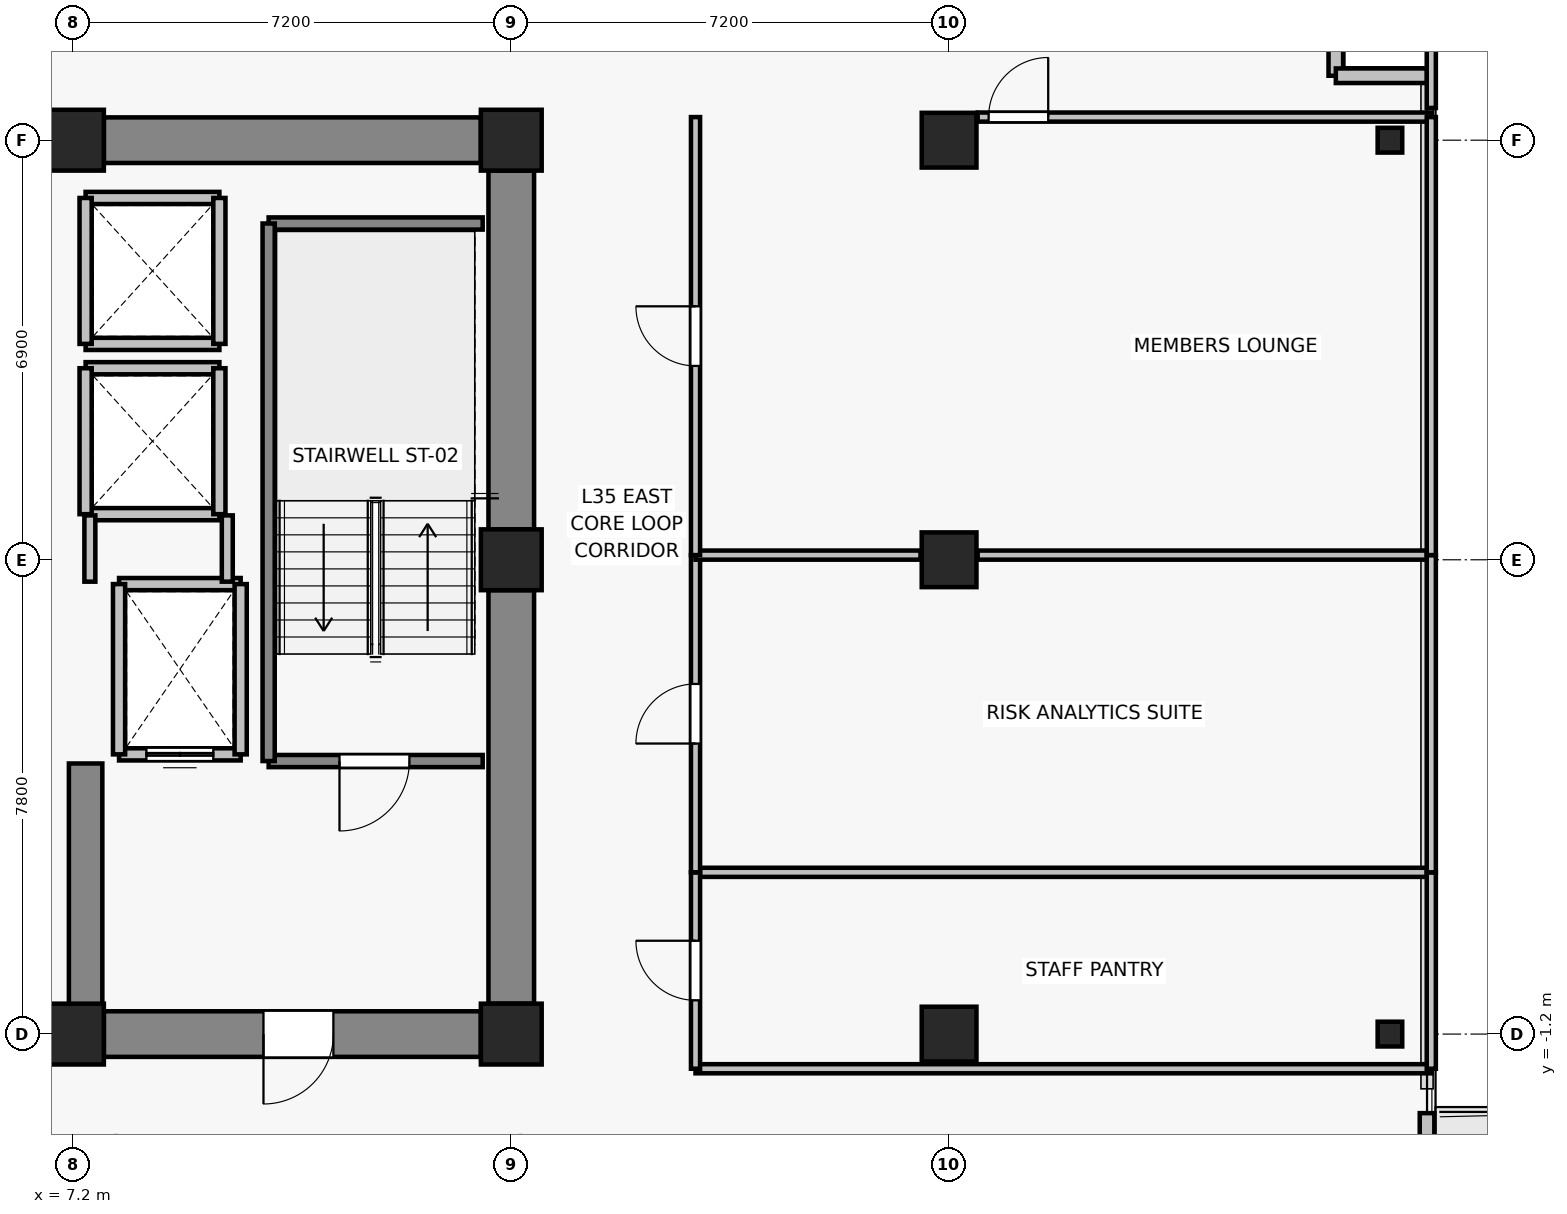
"""IFC4 building model, lengths in metres.
Left out: names, types, materials, properties, quantities, classifications, styles, units other than length and angle.
Written with IfcOpenShell. Run it as: python <this file> out.ifc"""

import sys

from ifc_helpers import new_model, si_unit, direction, frame, frame_2d, origin, origin_2d, place, context, subcontext, project, spatial, rectangle, i_section, extrude, source, transform, mapped, element, fill, save


model = new_model("IFC4")
c1 = context("Model", 3, precision=1e-05, world=origin(), true_north=direction((0.0, 1.0)))
c2 = subcontext(c1, "Body", "Model", "MODEL_VIEW")
j1 = project(units=[si_unit("LENGTHUNIT", "METRE"), si_unit("PLANEANGLEUNIT", "RADIAN")], contexts=[c1])
p1 = place(None, origin())
s1 = spatial("IfcSite", under=j1, at=p1, CompositionType="ELEMENT")
p2 = place(p1, origin())
s2 = spatial("IfcBuilding", under=s1, at=p2, CompositionType="ELEMENT")
p3 = place(p2, frame((0.0, 0.0, 126.4)))
s3 = spatial("IfcBuildingStorey", under=s2, at=p3, CompositionType="ELEMENT", Elevation=126.4)
for number, where, z_axis, x_axis in (
    (1, (7.2, -1.2, 0.0), (0.0, 0.0, 1.0), (1.0, 0.0, 0.0)),
    (2, (14.4, -1.2, 0.0), (0.0, 0.0, 1.0), (1.0, 0.0, 0.0)),
    (3, (14.4, 6.6, 0.0), (0.0, 0.0, 1.0), (1.0, 0.0, 0.0)),
    (4, (7.2, 13.5, 0.0), (0.0, 0.0, 1.0), (1.0, 0.0, 0.0)),
    (5, (14.4, 13.5, 0.0), (0.0, 0.0, 1.0), (1.0, 0.0, 0.0)),
):
    element("IfcColumn", number, at=place(p3, frame(where, z_axis=z_axis, x_axis=x_axis)), inside=s3, PredefinedType="COLUMN", context=c2, shape_type="SweptSolid", body=[
        extrude(rectangle(XDim=1.0, YDim=1.0, at=origin_2d()), origin(), (0.0, 0.0, 1.0), 3.3),
    ])
for number, where, z_axis, x_axis in (
    (6, (21.6, -1.2, 0.0), (0.0, 0.0, 1.0), (1.0, 0.0, 0.0)),
    (7, (21.6, 6.6, 0.0), (0.0, 0.0, 1.0), (1.0, 0.0, 0.0)),
    (8, (21.6, 13.5, 0.0), (0.0, 0.0, 1.0), (1.0, 0.0, 0.0)),
):
    element("IfcColumn", number, at=place(p3, frame(where, z_axis=z_axis, x_axis=x_axis)), inside=s3, PredefinedType="COLUMN", context=c2, shape_type="SweptSolid", body=[
        extrude(rectangle(XDim=0.9, YDim=0.9, at=origin_2d()), origin(), (0.0, 0.0, 1.0), 3.3),
    ])
for number, where, z_axis, x_axis in (
    (9, (28.85, -1.2, 0.0), (0.0, 0.0, 1.0), (1.0, 0.0, 0.0)),
    (10, (28.85, 13.5, 0.0), (0.0, 0.0, 1.0), (1.0, 0.0, 0.0)),
):
    element("IfcColumn", number, at=place(p3, frame(where, z_axis=z_axis, x_axis=x_axis)), inside=s3, PredefinedType="COLUMN", context=c2, shape_type="SweptSolid", body=[
        extrude(i_section(OverallWidth=0.404, OverallDepth=0.407, WebThickness=0.022, FlangeThickness=0.032, FilletRadius=0.015, at=origin_2d()), origin(), (0.0, 0.0, 1.0), 3.3),
    ])
p4 = place(p3, frame((7.7, 13.5, 0.0), z_axis=(0.0, 0.0, 1.0), x_axis=(1.0, 0.0, 0.0)))
e11 = element("IfcWall", 11, at=p4, inside=s3, PredefinedType="SHEAR", context=c2, shape_type="SweptSolid", body=[
    extrude(rectangle(XDim=6.2, YDim=0.75, at=frame_2d((3.1, 0.0))), origin(), (0.0, 0.0, 1.0), 3.075),
])
p5 = place(p3, frame((14.4, -0.7, 0.0), z_axis=(0.0, 0.0, 1.0), x_axis=(0.0, 1.0, 0.0)))
e12 = element("IfcWall", 12, at=p5, inside=s3, PredefinedType="SHEAR", context=c2, shape_type="SweptSolid", body=[
    extrude(rectangle(XDim=6.8, YDim=0.75, at=frame_2d((3.4, 0.0))), origin(), (0.0, 0.0, 1.0), 3.075),
])
p6 = place(p3, frame((14.4, 7.1, 0.0), z_axis=(0.0, 0.0, 1.0), x_axis=(0.0, 1.0, 0.0)))
e13 = element("IfcWall", 13, at=p6, inside=s3, PredefinedType="SHEAR", context=c2, shape_type="SweptSolid", body=[
    extrude(rectangle(XDim=5.9, YDim=0.75, at=frame_2d((2.95, 0.0))), origin(), (0.0, 0.0, 1.0), 3.075),
])
p7 = place(p3, frame((13.9, -1.2, 0.0), z_axis=(0.0, 0.0, 1.0), x_axis=(-1.0, 0.0, 0.0)))
e14 = element("IfcWall", 14, at=p7, inside=s3, PredefinedType="SHEAR", context=c2, shape_type="SweptSolid", body=[
    extrude(rectangle(XDim=6.2, YDim=0.75, at=frame_2d((3.1, 0.0))), origin(), (0.0, 0.0, 1.0), 3.075),
])
p8 = place(p7, frame((2.425, 0.0, 0.0)))
e15 = element("IfcOpeningElement", 15, at=p8, cuts=e14, PredefinedType="OPENING", context=c2, shape_type="SweptSolid", body=[
    extrude(rectangle(XDim=1.15, YDim=2.15, at=frame_2d((0.575, 1.075))), frame((0.0, 0.385, 0.0), z_axis=(0.0, -1.0, 0.0), x_axis=(1.0, 0.0, 0.0)), (0.0, 0.0, 1.0), 0.77),
])
p9 = place(p3, frame((7.4, -0.825, 0.0), z_axis=(0.0, 0.0, 1.0), x_axis=(0.0, 1.0, 0.0)))
e16 = element("IfcWall", 16, at=p9, inside=s3, PredefinedType="SHEAR", context=c2, shape_type="SweptSolid", body=[
    extrude(rectangle(XDim=4.075, YDim=0.55, at=frame_2d((2.038, 0.0))), origin(), (0.0, 0.0, 1.0), 3.075),
])
p10 = place(p3, frame((29.46, -2.5, 0.0), z_axis=(0.0, 0.0, 1.0), x_axis=(0.0, -1.0, 0.0)))
e17 = element("IfcWall", 17, at=p10, inside=s3, PredefinedType="SOLIDWALL", context=c2, shape_type="SweptSolid", body=[
    extrude(rectangle(XDim=5.8, YDim=0.24, at=frame_2d((2.9, 0.0))), origin(), (0.0, 0.0, 1.0), 3.075),
])
p11 = place(p10, frame((0.696, 0.0, 0.0)))
e18 = element("IfcOpeningElement", 18, at=p11, cuts=e17, PredefinedType="OPENING", context=c2, shape_type="SweptSolid", body=[
    extrude(rectangle(XDim=1.0, YDim=2.2, at=frame_2d((0.5, 1.1))), frame((0.0, 0.13, 0.0), z_axis=(0.0, -1.0, 0.0), x_axis=(1.0, 0.0, 0.0)), (0.0, 0.0, 1.0), 0.26),
])
p12 = place(p10, frame((2.046, 0.0, 0.85)))
e19 = element("IfcOpeningElement", 19, at=p12, cuts=e17, PredefinedType="OPENING", context=c2, shape_type="SweptSolid", body=[
    extrude(rectangle(XDim=0.9, YDim=1.35, at=frame_2d((0.45, 0.675))), frame((0.0, 0.13, 0.0), z_axis=(0.0, -1.0, 0.0), x_axis=(1.0, 0.0, 0.0)), (0.0, 0.0, 1.0), 0.26),
])
for number, where, z_axis, x_axis in (
    (20, (27.96, 14.56, 0.0), (0.0, 0.0, 1.0), (0.0, 1.0, 0.0)),
    (21, (29.46, 14.56, 0.0), (0.0, 0.0, 1.0), (-1.0, 0.0, 0.0)),
):
    element("IfcWall", number, at=place(p3, frame(where, z_axis=z_axis, x_axis=x_axis)), inside=s3, PredefinedType="SOLIDWALL", context=c2, shape_type="SweptSolid", body=[
        extrude(rectangle(XDim=1.5, YDim=0.24, at=frame_2d((0.75, 0.0))), origin(), (0.0, 0.0, 1.0), 3.075),
    ])
p13 = place(p3, frame((9.95, 3.4, 0.0), z_axis=(0.0, 0.0, 1.0), x_axis=(-1.0, 0.0, 0.0)))
e22 = element("IfcWall", 22, at=p13, inside=s3, PredefinedType="SOLIDWALL", context=c2, shape_type="SweptSolid", body=[
    extrude(rectangle(XDim=2.0, YDim=0.2, at=frame_2d((1.0, 0.0))), origin(), (0.0, 0.0, 1.0), 3.075),
])
p14 = place(p13, frame((0.45, 0.0, 0.0)))
e23 = element("IfcOpeningElement", 23, at=p14, cuts=e22, PredefinedType="OPENING", context=c2, shape_type="SweptSolid", body=[
    extrude(rectangle(XDim=1.1, YDim=2.2, at=frame_2d((0.55, 1.1))), frame((0.0, 0.11, 0.0), z_axis=(0.0, -1.0, 0.0), x_axis=(1.0, 0.0, 0.0)), (0.0, 0.0, 1.0), 0.22),
])
p15 = place(p3, frame((7.95, 6.2, 0.0), z_axis=(0.0, 0.0, 1.0), x_axis=(1.0, 0.0, 0.0)))
e24 = element("IfcWall", 24, at=p15, inside=s3, PredefinedType="SOLIDWALL", context=c2, shape_type="SweptSolid", body=[
    extrude(rectangle(XDim=2.0, YDim=0.2, at=frame_2d((1.0, 0.0))), origin(), (0.0, 0.0, 1.0), 3.075),
])
for number, where, z_axis, x_axis in (
    (25, (7.95, 3.4, 0.0), (0.0, 0.0, 1.0), (0.0, 1.0, 0.0)),
    (26, (9.95, 6.2, 0.0), (0.0, 0.0, 1.0), (0.0, -1.0, 0.0)),
):
    element("IfcWall", number, at=place(p3, frame(where, z_axis=z_axis, x_axis=x_axis)), inside=s3, PredefinedType="SOLIDWALL", context=c2, shape_type="SweptSolid", body=[
        extrude(rectangle(XDim=2.8, YDim=0.2, at=frame_2d((1.4, 0.0))), origin(), (0.0, 0.0, 1.0), 3.075),
    ])
for number, where, z_axis, x_axis in (
    (27, (9.6, 7.35, 0.0), (0.0, 0.0, 1.0), (-1.0, 0.0, 0.0)),
    (28, (7.4, 9.75, 0.0), (0.0, 0.0, 1.0), (1.0, 0.0, 0.0)),
):
    element("IfcWall", number, at=place(p3, frame(where, z_axis=z_axis, x_axis=x_axis)), inside=s3, PredefinedType="SOLIDWALL", context=c2, shape_type="SweptSolid", body=[
        extrude(rectangle(XDim=2.2, YDim=0.2, at=frame_2d((1.1, 0.0))), origin(), (0.0, 0.0, 1.0), 2.515),
    ])
p16 = place(p3, frame((7.4, 7.35, 0.0), z_axis=(0.0, 0.0, 1.0), x_axis=(0.0, 1.0, 0.0)))
e29 = element("IfcWall", 29, at=p16, inside=s3, PredefinedType="SOLIDWALL", context=c2, shape_type="SweptSolid", body=[
    extrude(rectangle(XDim=2.4, YDim=0.2, at=frame_2d((1.2, 0.0))), origin(), (0.0, 0.0, 1.0), 2.515),
])
p17 = place(p3, frame((9.6, 9.75, 0.0), z_axis=(0.0, 0.0, 1.0), x_axis=(0.0, -1.0, 0.0)))
e30 = element("IfcWall", 30, at=p17, inside=s3, PredefinedType="SOLIDWALL", context=c2, shape_type="SweptSolid", body=[
    extrude(rectangle(XDim=2.4, YDim=0.2, at=frame_2d((1.2, 0.0))), origin(), (0.0, 0.0, 1.0), 3.075),
])
for number, where, z_axis, x_axis in (
    (31, (9.6, 10.15, 0.0), (0.0, 0.0, 1.0), (-1.0, 0.0, 0.0)),
    (32, (7.4, 12.55, 0.0), (0.0, 0.0, 1.0), (1.0, 0.0, 0.0)),
):
    element("IfcWall", number, at=place(p3, frame(where, z_axis=z_axis, x_axis=x_axis)), inside=s3, PredefinedType="SOLIDWALL", context=c2, shape_type="SweptSolid", body=[
        extrude(rectangle(XDim=2.2, YDim=0.2, at=frame_2d((1.1, 0.0))), origin(), (0.0, 0.0, 1.0), 2.515),
    ])
p18 = place(p3, frame((7.4, 10.15, 0.0), z_axis=(0.0, 0.0, 1.0), x_axis=(0.0, 1.0, 0.0)))
e33 = element("IfcWall", 33, at=p18, inside=s3, PredefinedType="SOLIDWALL", context=c2, shape_type="SweptSolid", body=[
    extrude(rectangle(XDim=2.4, YDim=0.2, at=frame_2d((1.2, 0.0))), origin(), (0.0, 0.0, 1.0), 2.515),
])
p19 = place(p3, frame((9.6, 12.55, 0.0), z_axis=(0.0, 0.0, 1.0), x_axis=(0.0, -1.0, 0.0)))
e34 = element("IfcWall", 34, at=p19, inside=s3, PredefinedType="SOLIDWALL", context=c2, shape_type="SweptSolid", body=[
    extrude(rectangle(XDim=2.4, YDim=0.2, at=frame_2d((1.2, 0.0))), origin(), (0.0, 0.0, 1.0), 3.075),
])
p20 = place(p3, frame((13.93, 3.29, 0.0), z_axis=(0.0, 0.0, 1.0), x_axis=(-1.0, 0.0, 0.0)))
e35 = element("IfcWall", 35, at=p20, inside=s3, PredefinedType="SOLIDWALL", context=c2, shape_type="SweptSolid", body=[
    extrude(rectangle(XDim=3.52, YDim=0.2, at=frame_2d((1.76, 0.0))), origin(), (0.0, 0.0, 1.0), 3.075),
])
p21 = place(p20, frame((1.205, 0.0, 0.0)))
e36 = element("IfcOpeningElement", 36, at=p21, cuts=e35, PredefinedType="OPENING", context=c2, shape_type="SweptSolid", body=[
    extrude(rectangle(XDim=1.15, YDim=2.15, at=frame_2d((0.575, 1.075))), frame((0.0, 0.11, 0.0), z_axis=(0.0, -1.0, 0.0), x_axis=(1.0, 0.0, 0.0)), (0.0, 0.0, 1.0), 0.22),
])
p22 = place(p3, frame((10.41, 12.13, 0.0), z_axis=(0.0, 0.0, 1.0), x_axis=(1.0, 0.0, 0.0)))
e37 = element("IfcWall", 37, at=p22, inside=s3, PredefinedType="SOLIDWALL", context=c2, shape_type="SweptSolid", body=[
    extrude(rectangle(XDim=3.52, YDim=0.2, at=frame_2d((1.76, 0.0))), origin(), (0.0, 0.0, 1.0), 3.075),
])
p23 = place(p3, frame((10.41, 3.29, 0.0), z_axis=(0.0, 0.0, 1.0), x_axis=(0.0, 1.0, 0.0)))
e38 = element("IfcWall", 38, at=p23, inside=s3, PredefinedType="SOLIDWALL", context=c2, shape_type="SweptSolid", body=[
    extrude(rectangle(XDim=8.84, YDim=0.2, at=frame_2d((4.42, 0.0))), origin(), (0.0, 0.0, 1.0), 3.075),
])
p24 = place(p3, frame((7.47, 6.24, 0.0), z_axis=(0.0, 0.0, 1.0), x_axis=(0.0, 1.0, 0.0)))
e39 = element("IfcWall", 39, at=p24, inside=s3, PredefinedType="PARTITIONING", context=c2, shape_type="SweptSolid", body=[
    extrude(rectangle(XDim=1.09, YDim=0.18, at=frame_2d((0.545, 0.0))), origin(), (0.0, 0.0, 1.0), 2.515),
])
p25 = place(p3, frame((9.73, 7.33, 0.0), z_axis=(0.0, 0.0, 1.0), x_axis=(0.0, -1.0, 0.0)))
e40 = element("IfcWall", 40, at=p25, inside=s3, PredefinedType="PARTITIONING", context=c2, shape_type="SweptSolid", body=[
    extrude(rectangle(XDim=1.09, YDim=0.18, at=frame_2d((0.545, 0.0))), origin(), (0.0, 0.0, 1.0), 3.075),
])
for number, where, z_axis, x_axis in (
    (41, (29.53, -1.77, 0.0), (0.0, 0.0, 1.0), (-1.0, 0.0, 0.0)),
    (42, (17.43, 1.46, 0.0), (0.0, 0.0, 1.0), (1.0, 0.0, 0.0)),
):
    element("IfcWall", number, at=place(p3, frame(where, z_axis=z_axis, x_axis=x_axis)), inside=s3, PredefinedType="PARTITIONING", context=c2, shape_type="SweptSolid", body=[
        extrude(rectangle(XDim=12.1, YDim=0.15, at=frame_2d((6.05, 0.0))), origin(), (0.0, 0.0, 1.0), 2.515),
    ])
p26 = place(p3, frame((17.43, -1.77, 0.0), z_axis=(0.0, 0.0, 1.0), x_axis=(0.0, 1.0, 0.0)))
e43 = element("IfcWall", 43, at=p26, inside=s3, PredefinedType="PARTITIONING", context=c2, shape_type="SweptSolid", body=[
    extrude(rectangle(XDim=3.23, YDim=0.15, at=frame_2d((1.615, 0.0))), origin(), (0.0, 0.0, 1.0), 2.515),
])
p27 = place(p26, frame((1.125, 0.0, 0.0)))
e44 = element("IfcOpeningElement", 44, at=p27, cuts=e43, PredefinedType="OPENING", context=c2, shape_type="SweptSolid", body=[
    extrude(rectangle(XDim=0.98, YDim=2.15, at=frame_2d((0.49, 1.075))), frame((0.0, 0.085, 0.0), z_axis=(0.0, -1.0, 0.0), x_axis=(1.0, 0.0, 0.0)), (0.0, 0.0, 1.0), 0.17),
])
p28 = place(p3, frame((29.53, 1.46, 0.0), z_axis=(0.0, 0.0, 1.0), x_axis=(0.0, -1.0, 0.0)))
e45 = element("IfcWall", 45, at=p28, inside=s3, PredefinedType="PARTITIONING", context=c2, shape_type="SweptSolid", body=[
    extrude(rectangle(XDim=3.23, YDim=0.15, at=frame_2d((1.615, 0.0))), origin(), (0.0, 0.0, 1.0), 3.075),
])
p29 = place(p3, frame((22.07, 6.677, 0.0), z_axis=(0.0, 0.0, 1.0), x_axis=(1.0, 0.0, 0.0)))
e46 = element("IfcWall", 46, at=p29, inside=s3, PredefinedType="PARTITIONING", context=c2, shape_type="SweptSolid", body=[
    extrude(rectangle(XDim=7.46, YDim=0.15, at=frame_2d((3.73, 0.0))), origin(), (0.0, 0.0, 1.0), 2.565),
])
p30 = place(p3, frame((17.43, 1.46, 0.0), z_axis=(0.0, 0.0, 1.0), x_axis=(0.0, 1.0, 0.0)))
e47 = element("IfcWall", 47, at=p30, inside=s3, PredefinedType="PARTITIONING", context=c2, shape_type="SweptSolid", body=[
    extrude(rectangle(XDim=5.217, YDim=0.15, at=frame_2d((2.608, 0.0))), origin(), (0.0, 0.0, 1.0), 2.515),
])
p31 = place(p30, frame((2.118, 0.0, 0.0)))
e48 = element("IfcOpeningElement", 48, at=p31, cuts=e47, PredefinedType="OPENING", context=c2, shape_type="SweptSolid", body=[
    extrude(rectangle(XDim=0.98, YDim=2.15, at=frame_2d((0.49, 1.075))), frame((0.0, 0.085, 0.0), z_axis=(0.0, -1.0, 0.0), x_axis=(1.0, 0.0, 0.0)), (0.0, 0.0, 1.0), 0.17),
])
p32 = place(p3, frame((29.53, 6.677, 0.0), z_axis=(0.0, 0.0, 1.0), x_axis=(0.0, -1.0, 0.0)))
e49 = element("IfcWall", 49, at=p32, inside=s3, PredefinedType="PARTITIONING", context=c2, shape_type="SweptSolid", body=[
    extrude(rectangle(XDim=5.217, YDim=0.15, at=frame_2d((2.608, 0.0))), origin(), (0.0, 0.0, 1.0), 3.075),
])
p33 = place(p3, frame((21.13, 6.677, 0.0), z_axis=(0.0, 0.0, 1.0), x_axis=(-1.0, 0.0, 0.0)))
e50 = element("IfcWall", 50, at=p33, inside=s3, PredefinedType="PARTITIONING", context=c2, shape_type="SweptSolid", body=[
    extrude(rectangle(XDim=3.7, YDim=0.15, at=frame_2d((1.85, 0.0))), origin(), (0.0, 0.0, 1.0), 2.515),
])
p34 = place(p3, frame((22.07, 13.88, 0.0), z_axis=(0.0, 0.0, 1.0), x_axis=(1.0, 0.0, 0.0)))
e51 = element("IfcWall", 51, at=p34, inside=s3, PredefinedType="PARTITIONING", context=c2, shape_type="SweptSolid", body=[
    extrude(rectangle(XDim=7.46, YDim=0.15, at=frame_2d((3.73, 0.0))), origin(), (0.0, 0.0, 1.0), 3.075),
])
p35 = place(p34, frame((0.18, 0.0, 0.0)))
e52 = element("IfcOpeningElement", 52, at=p35, cuts=e51, PredefinedType="OPENING", context=c2, shape_type="SweptSolid", body=[
    extrude(rectangle(XDim=0.98, YDim=2.15, at=frame_2d((0.49, 1.075))), frame((0.0, 0.085, 0.0), z_axis=(0.0, -1.0, 0.0), x_axis=(1.0, 0.0, 0.0)), (0.0, 0.0, 1.0), 0.17),
])
p36 = place(p3, frame((17.43, 6.677, 0.0), z_axis=(0.0, 0.0, 1.0), x_axis=(0.0, 1.0, 0.0)))
e53 = element("IfcWall", 53, at=p36, inside=s3, PredefinedType="PARTITIONING", context=c2, shape_type="SweptSolid", body=[
    extrude(rectangle(XDim=7.203, YDim=0.15, at=frame_2d((3.602, 0.0))), origin(), (0.0, 0.0, 1.0), 2.515),
])
p37 = place(p36, frame((3.111, 0.0, 0.0)))
e54 = element("IfcOpeningElement", 54, at=p37, cuts=e53, PredefinedType="OPENING", context=c2, shape_type="SweptSolid", body=[
    extrude(rectangle(XDim=0.98, YDim=2.15, at=frame_2d((0.49, 1.075))), frame((0.0, 0.085, 0.0), z_axis=(0.0, -1.0, 0.0), x_axis=(1.0, 0.0, 0.0)), (0.0, 0.0, 1.0), 0.17),
])
p38 = place(p3, frame((29.53, 13.88, 0.0), z_axis=(0.0, 0.0, 1.0), x_axis=(0.0, -1.0, 0.0)))
e55 = element("IfcWall", 55, at=p38, inside=s3, PredefinedType="PARTITIONING", context=c2, shape_type="SweptSolid", body=[
    extrude(rectangle(XDim=7.203, YDim=0.15, at=frame_2d((3.602, 0.0))), origin(), (0.0, 0.0, 1.0), 3.075),
])
p39 = place(p3, frame((29.53, 17.63, 0.0), z_axis=(0.0, 0.0, 1.0), x_axis=(0.0, -1.0, 0.0)))
e56 = element("IfcWall", 56, at=p39, inside=s3, PredefinedType="PARTITIONING", context=c2, shape_type="SweptSolid", body=[
    extrude(rectangle(XDim=3.6, YDim=0.15, at=frame_2d((1.8, 0.0))), origin(), (0.0, 0.0, 1.0), 3.075),
])
m1 = source(origin(), c2, "Body", "SweptSolid", [
    extrude(rectangle(XDim=1.1, YDim=2.2, at=frame_2d((0.55, 1.1))), frame((0.0, 0.025, 0.0), z_axis=(0.0, -1.0, 0.0), x_axis=(1.0, 0.0, 0.0)), (0.0, 0.0, 1.0), 0.05),
])
p40 = place(p14, origin())
e57 = element("IfcDoor", 57, at=p40, inside=s3, OperationType="DOUBLE_DOOR_SLIDING", PredefinedType="DOOR", context=c2, shape_type="MappedRepresentation", body=[
    mapped(m1, transform((0.0, 0.0, 0.0), x_axis=(1.0, 0.0, 0.0), y_axis=(0.0, 1.0, 0.0), z_axis=(0.0, 0.0, 1.0), scale=1.0)),
])
fill(e23, e57)
m2 = source(origin(), c2, "Body", "SweptSolid", [
    extrude(rectangle(XDim=1.15, YDim=2.15, at=frame_2d((0.575, 1.075))), frame((0.0, 0.025, 0.0), z_axis=(0.0, -1.0, 0.0), x_axis=(1.0, 0.0, 0.0)), (0.0, 0.0, 1.0), 0.05),
])
p41 = place(p21, origin())
e58 = element("IfcDoor", 58, at=p41, inside=s3, OperationType="SINGLE_SWING_RIGHT", PredefinedType="DOOR", context=c2, shape_type="MappedRepresentation", body=[
    mapped(m2, transform((0.0, 0.0, 0.0), x_axis=(1.0, 0.0, 0.0), y_axis=(0.0, 1.0, 0.0), z_axis=(0.0, 0.0, 1.0), scale=1.0)),
])
fill(e36, e58)
p42 = place(p8, origin())
e59 = element("IfcDoor", 59, at=p42, inside=s3, OperationType="SINGLE_SWING_RIGHT", PredefinedType="DOOR", context=c2, shape_type="MappedRepresentation", body=[
    mapped(m2, transform((0.0, 0.0, 0.0), x_axis=(1.0, 0.0, 0.0), y_axis=(0.0, 1.0, 0.0), z_axis=(0.0, 0.0, 1.0), scale=1.0)),
])
fill(e15, e59)
m3 = source(origin(), c2, "Body", "SweptSolid", [
    extrude(rectangle(XDim=0.98, YDim=2.15, at=frame_2d((0.49, 1.075))), frame((0.0, 0.025, 0.0), z_axis=(0.0, -1.0, 0.0), x_axis=(1.0, 0.0, 0.0)), (0.0, 0.0, 1.0), 0.05),
])
p43 = place(p27, origin())
e60 = element("IfcDoor", 60, at=p43, inside=s3, OperationType="SINGLE_SWING_RIGHT", PredefinedType="DOOR", context=c2, shape_type="MappedRepresentation", body=[
    mapped(m3, transform((0.0, 0.0, 0.0), x_axis=(1.0, 0.0, 0.0), y_axis=(0.0, 1.0, 0.0), z_axis=(0.0, 0.0, 1.0), scale=1.0)),
])
fill(e44, e60)
p44 = place(p31, origin())
e61 = element("IfcDoor", 61, at=p44, inside=s3, OperationType="SINGLE_SWING_LEFT", PredefinedType="DOOR", context=c2, shape_type="MappedRepresentation", body=[
    mapped(m3, transform((0.0, 0.0, 0.0), x_axis=(1.0, 0.0, 0.0), y_axis=(0.0, 1.0, 0.0), z_axis=(0.0, 0.0, 1.0), scale=1.0)),
])
fill(e48, e61)
p45 = place(p37, origin())
e62 = element("IfcDoor", 62, at=p45, inside=s3, OperationType="SINGLE_SWING_RIGHT", PredefinedType="DOOR", context=c2, shape_type="MappedRepresentation", body=[
    mapped(m3, transform((0.0, 0.0, 0.0), x_axis=(1.0, 0.0, 0.0), y_axis=(0.0, 1.0, 0.0), z_axis=(0.0, 0.0, 1.0), scale=1.0)),
])
fill(e54, e62)
p46 = place(p35, origin())
e63 = element("IfcDoor", 63, at=p46, inside=s3, OperationType="SINGLE_SWING_RIGHT", PredefinedType="DOOR", context=c2, shape_type="MappedRepresentation", body=[
    mapped(m3, transform((0.0, 0.0, 0.0), x_axis=(1.0, 0.0, 0.0), y_axis=(0.0, 1.0, 0.0), z_axis=(0.0, 0.0, 1.0), scale=1.0)),
])
fill(e52, e63)
save(model, sys.argv[1])
